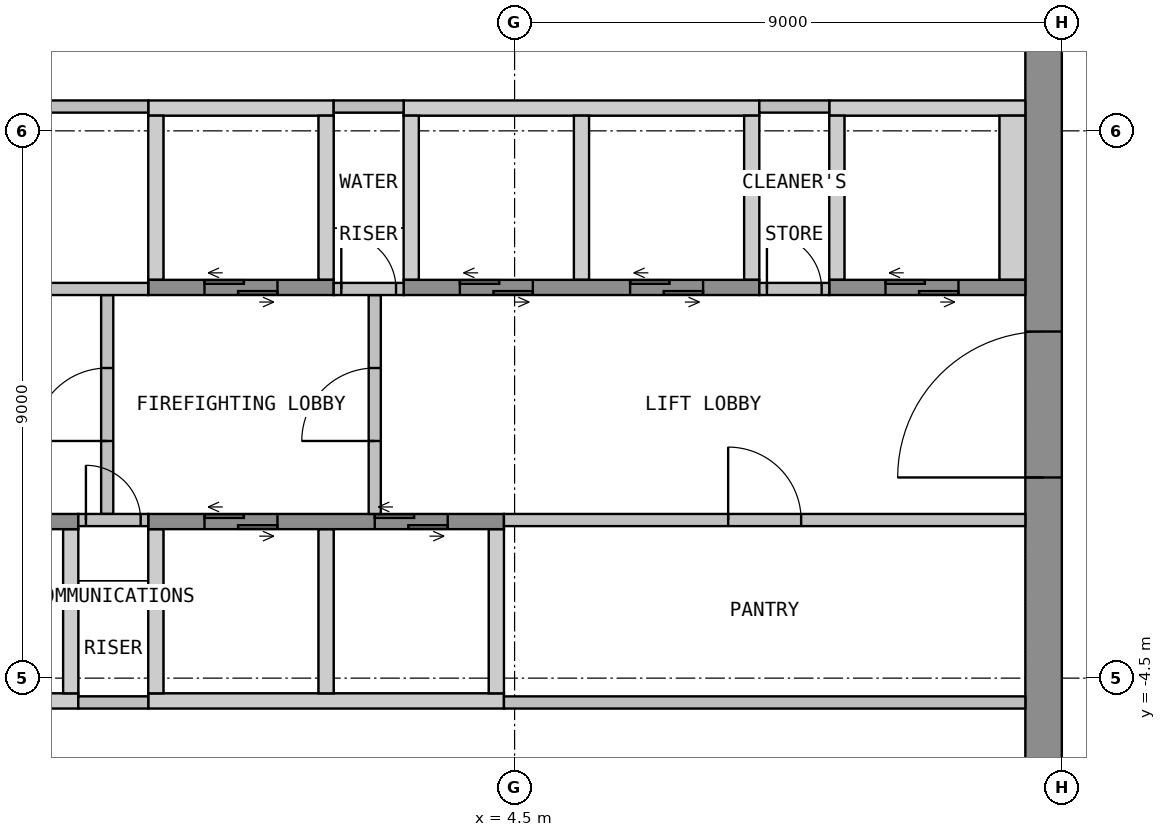
"""IFC4 building model, lengths in metres.
Left out: names, types, materials, properties, quantities, classifications, styles, units other than length and angle.
Written with IfcOpenShell. Run it as: python <this file> out.ifc"""

import sys

from ifc_helpers import new_model, si_unit, direction, frame, frame_2d, origin, place, context, subcontext, project, spatial, polyline, rectangle, outline, extrude, element, fill, save


model = new_model("IFC4")
c1 = context("Model", 3, precision=1e-05, world=origin(), true_north=direction((0.0, 1.0)))
c2 = subcontext(c1, "Body", "Model", "MODEL_VIEW")
j1 = project(units=[si_unit("LENGTHUNIT", "METRE"), si_unit("PLANEANGLEUNIT", "RADIAN")], contexts=[c1])
p1 = place(None, origin())
s1 = spatial("IfcSite", under=j1, at=p1, CompositionType="ELEMENT")
p2 = place(p1, origin())
s2 = spatial("IfcBuilding", under=s1, at=p2, CompositionType="ELEMENT")
p3 = place(p2, frame((0.0, 0.0, 282.0)))
s3 = spatial("IfcBuildingStorey", under=s2, at=p3, CompositionType="ELEMENT", Elevation=282.0)
p4 = place(p3, frame((13.2, -10.65, 0.0), z_axis=(0.0, 0.0, 1.0), x_axis=(0.0, 1.0, 0.0)))
e1 = element("IfcWall", 1, at=p4, inside=s3, PredefinedType="SHEAR", context=c2, shape_type="SweptSolid", body=[
    extrude(rectangle(XDim=21.3, YDim=0.6, at=frame_2d((10.65, 0.0))), origin(), (0.0, 0.0, 1.0), 4.175),
])
p5 = place(p4, frame((9.45, 0.0, 0.0)))
e2 = element("IfcOpeningElement", 2, at=p5, cuts=e1, PredefinedType="OPENING", context=c2, shape_type="SweptSolid", body=[
    extrude(rectangle(XDim=2.4, YDim=2.1, at=frame_2d((1.2, 1.05))), frame((0.0, 0.31, 0.0), z_axis=(0.0, -1.0, 0.0), x_axis=(1.0, 0.0, 0.0)), (0.0, 0.0, 1.0), 0.62),
])
p6 = place(p3, origin())
e3 = element("IfcWall", 3, at=p6, inside=s3, PredefinedType="SHEAR", context=c2, shape_type="SweptSolid", body=[
    extrude(outline(polyline([(-1.525, 4.75), (1.525, 4.75), (1.525, 5.0), (-1.525, 5.0), (-1.525, 4.75)])), origin(), (0.0, 0.0, 1.0), 4.175),
])
p7 = place(p3, origin())
e4 = element("IfcWall", 4, at=p7, inside=s3, PredefinedType="SHEAR", context=c2, shape_type="SweptSolid", body=[
    extrude(outline(polyline([(2.675, 4.75), (8.525, 4.75), (8.525, 5.0), (2.675, 5.0), (2.675, 4.75)])), origin(), (0.0, 0.0, 1.0), 4.175),
])
p8 = place(p3, origin())
e5 = element("IfcWall", 5, at=p8, inside=s3, PredefinedType="SHEAR", context=c2, shape_type="SweptSolid", body=[
    extrude(outline(polyline([(9.675, 4.75), (12.9, 4.75), (12.9, 5.0), (9.675, 5.0), (9.675, 4.75)])), origin(), (0.0, 0.0, 1.0), 4.175),
])
p9 = place(p3, origin())
e6 = element("IfcWall", 6, at=p9, inside=s3, PredefinedType="SHEAR", context=c2, shape_type="SweptSolid", body=[
    extrude(outline(polyline([(-1.525, 2.05), (-1.275, 2.05), (-1.275, 4.75), (-1.525, 4.75), (-1.525, 2.05)])), origin(), (0.0, 0.0, 1.0), 4.175),
])
p10 = place(p3, origin())
e7 = element("IfcWall", 7, at=p10, inside=s3, PredefinedType="SHEAR", context=c2, shape_type="SweptSolid", body=[
    extrude(outline(polyline([(1.275, 2.05), (1.525, 2.05), (1.525, 4.75), (1.275, 4.75), (1.275, 2.05)])), origin(), (0.0, 0.0, 1.0), 4.175),
])
p11 = place(p3, origin())
e8 = element("IfcWall", 8, at=p11, inside=s3, PredefinedType="SHEAR", context=c2, shape_type="SweptSolid", body=[
    extrude(outline(polyline([(2.675, 2.05), (2.925, 2.05), (2.925, 4.75), (2.675, 4.75), (2.675, 2.05)])), origin(), (0.0, 0.0, 1.0), 4.175),
])
p12 = place(p3, origin())
e9 = element("IfcWall", 9, at=p12, inside=s3, PredefinedType="SHEAR", context=c2, shape_type="SweptSolid", body=[
    extrude(outline(polyline([(5.475, 2.05), (5.725, 2.05), (5.725, 4.75), (5.475, 4.75), (5.475, 2.05)])), origin(), (0.0, 0.0, 1.0), 4.175),
])
p13 = place(p3, origin())
e10 = element("IfcWall", 10, at=p13, inside=s3, PredefinedType="SHEAR", context=c2, shape_type="SweptSolid", body=[
    extrude(outline(polyline([(8.275, 2.05), (8.525, 2.05), (8.525, 4.75), (8.275, 4.75), (8.275, 2.05)])), origin(), (0.0, 0.0, 1.0), 4.175),
])
p14 = place(p3, origin())
e11 = element("IfcWall", 11, at=p14, inside=s3, PredefinedType="SHEAR", context=c2, shape_type="SweptSolid", body=[
    extrude(outline(polyline([(9.675, 2.05), (9.925, 2.05), (9.925, 4.75), (9.675, 4.75), (9.675, 2.05)])), origin(), (0.0, 0.0, 1.0), 4.175),
])
p15 = place(p3, origin())
e12 = element("IfcWall", 12, at=p15, inside=s3, PredefinedType="SHEAR", context=c2, shape_type="SweptSolid", body=[
    extrude(outline(polyline([(12.475, 2.05), (12.9, 2.05), (12.9, 4.75), (12.475, 4.75), (12.475, 2.05)])), origin(), (0.0, 0.0, 1.0), 4.175),
])
p16 = place(p3, frame((-1.525, 1.925, 0.0), z_axis=(0.0, 0.0, 1.0), x_axis=(1.0, 0.0, 0.0)))
e13 = element("IfcWall", 13, at=p16, inside=s3, PredefinedType="SHEAR", context=c2, shape_type="SweptSolid", body=[
    extrude(rectangle(XDim=3.05, YDim=0.25, at=frame_2d((1.525, 0.0))), origin(), (0.0, 0.0, 1.0), 4.175),
])
p17 = place(p16, frame((0.925, 0.0, 0.0)))
e14 = element("IfcOpeningElement", 14, at=p17, cuts=e13, PredefinedType="OPENING", context=c2, shape_type="SweptSolid", body=[
    extrude(rectangle(XDim=1.2, YDim=2.1, at=frame_2d((0.6, 1.05))), frame((0.0, 0.135, 0.0), z_axis=(0.0, -1.0, 0.0), x_axis=(1.0, 0.0, 0.0)), (0.0, 0.0, 1.0), 0.27),
])
p18 = place(p3, frame((2.675, 1.925, 0.0), z_axis=(0.0, 0.0, 1.0), x_axis=(1.0, 0.0, 0.0)))
e15 = element("IfcWall", 15, at=p18, inside=s3, PredefinedType="SHEAR", context=c2, shape_type="SweptSolid", body=[
    extrude(rectangle(XDim=5.85, YDim=0.25, at=frame_2d((2.925, 0.0))), origin(), (0.0, 0.0, 1.0), 4.175),
])
p19 = place(p18, frame((0.925, 0.0, 0.0)))
e16 = element("IfcOpeningElement", 16, at=p19, cuts=e15, PredefinedType="OPENING", context=c2, shape_type="SweptSolid", body=[
    extrude(rectangle(XDim=1.2, YDim=2.1, at=frame_2d((0.6, 1.05))), frame((0.0, 0.135, 0.0), z_axis=(0.0, -1.0, 0.0), x_axis=(1.0, 0.0, 0.0)), (0.0, 0.0, 1.0), 0.27),
])
p20 = place(p18, frame((3.725, 0.0, 0.0)))
e17 = element("IfcOpeningElement", 17, at=p20, cuts=e15, PredefinedType="OPENING", context=c2, shape_type="SweptSolid", body=[
    extrude(rectangle(XDim=1.2, YDim=2.1, at=frame_2d((0.6, 1.05))), frame((0.0, 0.135, 0.0), z_axis=(0.0, -1.0, 0.0), x_axis=(1.0, 0.0, 0.0)), (0.0, 0.0, 1.0), 0.27),
])
p21 = place(p3, frame((9.675, 1.925, 0.0), z_axis=(0.0, 0.0, 1.0), x_axis=(1.0, 0.0, 0.0)))
e18 = element("IfcWall", 18, at=p21, inside=s3, PredefinedType="SHEAR", context=c2, shape_type="SweptSolid", body=[
    extrude(rectangle(XDim=3.225, YDim=0.25, at=frame_2d((1.612, 0.0))), origin(), (0.0, 0.0, 1.0), 4.175),
])
p22 = place(p21, frame((0.925, 0.0, 0.0)))
e19 = element("IfcOpeningElement", 19, at=p22, cuts=e18, PredefinedType="OPENING", context=c2, shape_type="SweptSolid", body=[
    extrude(rectangle(XDim=1.2, YDim=2.1, at=frame_2d((0.6, 1.05))), frame((0.0, 0.135, 0.0), z_axis=(0.0, -1.0, 0.0), x_axis=(1.0, 0.0, 0.0)), (0.0, 0.0, 1.0), 0.27),
])
p23 = place(p3, origin())
e20 = element("IfcWall", 20, at=p23, inside=s3, PredefinedType="SHEAR", context=c2, shape_type="SweptSolid", body=[
    extrude(outline(polyline([(-11.325, -5.0), (-2.675, -5.0), (-2.675, -4.75), (-11.325, -4.75), (-11.325, -5.0)])), origin(), (0.0, 0.0, 1.0), 4.175),
])
p24 = place(p3, origin())
e21 = element("IfcWall", 21, at=p24, inside=s3, PredefinedType="SHEAR", context=c2, shape_type="SweptSolid", body=[
    extrude(outline(polyline([(-1.525, -5.0), (4.325, -5.0), (4.325, -4.75), (-1.525, -4.75), (-1.525, -5.0)])), origin(), (0.0, 0.0, 1.0), 4.175),
])
p25 = place(p3, origin())
e22 = element("IfcWall", 22, at=p25, inside=s3, PredefinedType="SHEAR", context=c2, shape_type="SweptSolid", body=[
    extrude(outline(polyline([(-2.925, -4.75), (-2.675, -4.75), (-2.675, -2.05), (-2.925, -2.05), (-2.925, -4.75)])), origin(), (0.0, 0.0, 1.0), 4.175),
])
p26 = place(p3, origin())
e23 = element("IfcWall", 23, at=p26, inside=s3, PredefinedType="SHEAR", context=c2, shape_type="SweptSolid", body=[
    extrude(outline(polyline([(-1.525, -4.75), (-1.275, -4.75), (-1.275, -2.05), (-1.525, -2.05), (-1.525, -4.75)])), origin(), (0.0, 0.0, 1.0), 4.175),
])
p27 = place(p3, origin())
e24 = element("IfcWall", 24, at=p27, inside=s3, PredefinedType="SHEAR", context=c2, shape_type="SweptSolid", body=[
    extrude(outline(polyline([(1.275, -4.75), (1.525, -4.75), (1.525, -2.05), (1.275, -2.05), (1.275, -4.75)])), origin(), (0.0, 0.0, 1.0), 4.175),
])
p28 = place(p3, origin())
e25 = element("IfcWall", 25, at=p28, inside=s3, PredefinedType="SHEAR", context=c2, shape_type="SweptSolid", body=[
    extrude(outline(polyline([(4.075, -4.75), (4.325, -4.75), (4.325, -2.05), (4.075, -2.05), (4.075, -4.75)])), origin(), (0.0, 0.0, 1.0), 4.175),
])
p29 = place(p3, frame((-11.325, -1.925, 0.0), z_axis=(0.0, 0.0, 1.0), x_axis=(1.0, 0.0, 0.0)))
e26 = element("IfcWall", 26, at=p29, inside=s3, PredefinedType="SHEAR", context=c2, shape_type="SweptSolid", body=[
    extrude(rectangle(XDim=8.65, YDim=0.25, at=frame_2d((4.325, 0.0))), origin(), (0.0, 0.0, 1.0), 4.175),
])
p30 = place(p29, frame((0.925, 0.0, 0.0)))
e27 = element("IfcOpeningElement", 27, at=p30, cuts=e26, PredefinedType="OPENING", context=c2, shape_type="SweptSolid", body=[
    extrude(rectangle(XDim=1.2, YDim=2.1, at=frame_2d((0.6, 1.05))), frame((0.0, 0.135, 0.0), z_axis=(0.0, -1.0, 0.0), x_axis=(1.0, 0.0, 0.0)), (0.0, 0.0, 1.0), 0.27),
])
p31 = place(p29, frame((3.725, 0.0, 0.0)))
e28 = element("IfcOpeningElement", 28, at=p31, cuts=e26, PredefinedType="OPENING", context=c2, shape_type="SweptSolid", body=[
    extrude(rectangle(XDim=1.2, YDim=2.1, at=frame_2d((0.6, 1.05))), frame((0.0, 0.135, 0.0), z_axis=(0.0, -1.0, 0.0), x_axis=(1.0, 0.0, 0.0)), (0.0, 0.0, 1.0), 0.27),
])
p32 = place(p29, frame((6.525, 0.0, 0.0)))
e29 = element("IfcOpeningElement", 29, at=p32, cuts=e26, PredefinedType="OPENING", context=c2, shape_type="SweptSolid", body=[
    extrude(rectangle(XDim=1.2, YDim=2.1, at=frame_2d((0.6, 1.05))), frame((0.0, 0.135, 0.0), z_axis=(0.0, -1.0, 0.0), x_axis=(1.0, 0.0, 0.0)), (0.0, 0.0, 1.0), 0.27),
])
p33 = place(p3, frame((-1.525, -1.925, 0.0), z_axis=(0.0, 0.0, 1.0), x_axis=(1.0, 0.0, 0.0)))
e30 = element("IfcWall", 30, at=p33, inside=s3, PredefinedType="SHEAR", context=c2, shape_type="SweptSolid", body=[
    extrude(rectangle(XDim=5.85, YDim=0.25, at=frame_2d((2.925, 0.0))), origin(), (0.0, 0.0, 1.0), 4.175),
])
p34 = place(p33, frame((0.925, 0.0, 0.0)))
e31 = element("IfcOpeningElement", 31, at=p34, cuts=e30, PredefinedType="OPENING", context=c2, shape_type="SweptSolid", body=[
    extrude(rectangle(XDim=1.2, YDim=2.1, at=frame_2d((0.6, 1.05))), frame((0.0, 0.135, 0.0), z_axis=(0.0, -1.0, 0.0), x_axis=(1.0, 0.0, 0.0)), (0.0, 0.0, 1.0), 0.27),
])
p35 = place(p33, frame((3.725, 0.0, 0.0)))
e32 = element("IfcOpeningElement", 32, at=p35, cuts=e30, PredefinedType="OPENING", context=c2, shape_type="SweptSolid", body=[
    extrude(rectangle(XDim=1.2, YDim=2.1, at=frame_2d((0.6, 1.05))), frame((0.0, 0.135, 0.0), z_axis=(0.0, -1.0, 0.0), x_axis=(1.0, 0.0, 0.0)), (0.0, 0.0, 1.0), 0.27),
])
p36 = place(p3, frame((-2.2, -1.8, 0.0), z_axis=(0.0, 0.0, 1.0), x_axis=(0.0, 1.0, 0.0)))
e33 = element("IfcWall", 33, at=p36, inside=s3, PredefinedType="PARTITIONING", context=c2, shape_type="SweptSolid", body=[
    extrude(rectangle(XDim=3.6, YDim=0.2, at=frame_2d((1.8, 0.0))), origin(), (0.0, 0.0, 1.0), 4.175),
])
p37 = place(p36, frame((1.2, 0.0, 0.0)))
e34 = element("IfcOpeningElement", 34, at=p37, cuts=e33, PredefinedType="OPENING", context=c2, shape_type="SweptSolid", body=[
    extrude(rectangle(XDim=1.2, YDim=2.1, at=frame_2d((0.6, 1.05))), frame((0.0, 0.11, 0.0), z_axis=(0.0, -1.0, 0.0), x_axis=(1.0, 0.0, 0.0)), (0.0, 0.0, 1.0), 0.22),
])
p38 = place(p3, frame((2.2, -1.8, 0.0), z_axis=(0.0, 0.0, 1.0), x_axis=(0.0, 1.0, 0.0)))
e35 = element("IfcWall", 35, at=p38, inside=s3, PredefinedType="PARTITIONING", context=c2, shape_type="SweptSolid", body=[
    extrude(rectangle(XDim=3.6, YDim=0.2, at=frame_2d((1.8, 0.0))), origin(), (0.0, 0.0, 1.0), 4.175),
])
p39 = place(p38, frame((1.2, 0.0, 0.0)))
e36 = element("IfcOpeningElement", 36, at=p39, cuts=e35, PredefinedType="OPENING", context=c2, shape_type="SweptSolid", body=[
    extrude(rectangle(XDim=1.2, YDim=2.1, at=frame_2d((0.6, 1.05))), frame((0.0, 0.11, 0.0), z_axis=(0.0, -1.0, 0.0), x_axis=(1.0, 0.0, 0.0)), (0.0, 0.0, 1.0), 0.22),
])
p40 = place(p3, frame((-12.9, 1.9, 0.0), z_axis=(0.0, 0.0, 1.0), x_axis=(1.0, 0.0, 0.0)))
e37 = element("IfcWall", 37, at=p40, inside=s3, PredefinedType="PARTITIONING", context=c2, shape_type="SweptSolid", body=[
    extrude(rectangle(XDim=11.375, YDim=0.2, at=frame_2d((5.688, 0.0))), origin(), (0.0, 0.0, 1.0), 4.175),
])
p41 = place(p40, frame((5.087, 0.0, 0.0)))
e38 = element("IfcOpeningElement", 38, at=p41, cuts=e37, PredefinedType="OPENING", context=c2, shape_type="SweptSolid", body=[
    extrude(rectangle(XDim=1.2, YDim=2.1, at=frame_2d((0.6, 1.05))), frame((0.0, 0.11, 0.0), z_axis=(0.0, -1.0, 0.0), x_axis=(1.0, 0.0, 0.0)), (0.0, 0.0, 1.0), 0.22),
])
p42 = place(p3, frame((-12.9, 4.9, 0.0), z_axis=(0.0, 0.0, 1.0), x_axis=(1.0, 0.0, 0.0)))
e39 = element("IfcWall", 39, at=p42, inside=s3, PredefinedType="PARTITIONING", context=c2, shape_type="SweptSolid", body=[
    extrude(rectangle(XDim=11.375, YDim=0.2, at=frame_2d((5.688, 0.0))), origin(), (0.0, 0.0, 1.0), 4.175),
])
p43 = place(p3, frame((1.525, 1.9, 0.0), z_axis=(0.0, 0.0, 1.0), x_axis=(1.0, 0.0, 0.0)))
e40 = element("IfcWall", 40, at=p43, inside=s3, PredefinedType="PARTITIONING", context=c2, shape_type="SweptSolid", body=[
    extrude(rectangle(XDim=1.15, YDim=0.2, at=frame_2d((0.575, 0.0))), origin(), (0.0, 0.0, 1.0), 4.175),
])
p44 = place(p43, frame((0.125, 0.0, 0.0)))
e41 = element("IfcOpeningElement", 41, at=p44, cuts=e40, PredefinedType="OPENING", context=c2, shape_type="SweptSolid", body=[
    extrude(rectangle(XDim=0.9, YDim=2.1, at=frame_2d((0.45, 1.05))), frame((0.0, 0.11, 0.0), z_axis=(0.0, -1.0, 0.0), x_axis=(1.0, 0.0, 0.0)), (0.0, 0.0, 1.0), 0.22),
])
p45 = place(p3, frame((1.525, 4.9, 0.0), z_axis=(0.0, 0.0, 1.0), x_axis=(1.0, 0.0, 0.0)))
e42 = element("IfcWall", 42, at=p45, inside=s3, PredefinedType="PARTITIONING", context=c2, shape_type="SweptSolid", body=[
    extrude(rectangle(XDim=1.15, YDim=0.2, at=frame_2d((0.575, 0.0))), origin(), (0.0, 0.0, 1.0), 4.175),
])
p46 = place(p3, frame((8.525, 1.9, 0.0), z_axis=(0.0, 0.0, 1.0), x_axis=(1.0, 0.0, 0.0)))
e43 = element("IfcWall", 43, at=p46, inside=s3, PredefinedType="PARTITIONING", context=c2, shape_type="SweptSolid", body=[
    extrude(rectangle(XDim=1.15, YDim=0.2, at=frame_2d((0.575, 0.0))), origin(), (0.0, 0.0, 1.0), 4.175),
])
p47 = place(p46, frame((0.125, 0.0, 0.0)))
e44 = element("IfcOpeningElement", 44, at=p47, cuts=e43, PredefinedType="OPENING", context=c2, shape_type="SweptSolid", body=[
    extrude(rectangle(XDim=0.9, YDim=2.1, at=frame_2d((0.45, 1.05))), frame((0.0, 0.11, 0.0), z_axis=(0.0, -1.0, 0.0), x_axis=(1.0, 0.0, 0.0)), (0.0, 0.0, 1.0), 0.22),
])
p48 = place(p3, frame((8.525, 4.9, 0.0), z_axis=(0.0, 0.0, 1.0), x_axis=(1.0, 0.0, 0.0)))
e45 = element("IfcWall", 45, at=p48, inside=s3, PredefinedType="PARTITIONING", context=c2, shape_type="SweptSolid", body=[
    extrude(rectangle(XDim=1.15, YDim=0.2, at=frame_2d((0.575, 0.0))), origin(), (0.0, 0.0, 1.0), 4.175),
])
p49 = place(p3, frame((-2.675, -1.9, 0.0), z_axis=(0.0, 0.0, 1.0), x_axis=(1.0, 0.0, 0.0)))
e46 = element("IfcWall", 46, at=p49, inside=s3, PredefinedType="PARTITIONING", context=c2, shape_type="SweptSolid", body=[
    extrude(rectangle(XDim=1.15, YDim=0.2, at=frame_2d((0.575, 0.0))), origin(), (0.0, 0.0, 1.0), 4.175),
])
p50 = place(p49, frame((0.125, 0.0, 0.0)))
e47 = element("IfcOpeningElement", 47, at=p50, cuts=e46, PredefinedType="OPENING", context=c2, shape_type="SweptSolid", body=[
    extrude(rectangle(XDim=0.9, YDim=2.1, at=frame_2d((0.45, 1.05))), frame((0.0, 0.11, 0.0), z_axis=(0.0, -1.0, 0.0), x_axis=(1.0, 0.0, 0.0)), (0.0, 0.0, 1.0), 0.22),
])
p51 = place(p3, frame((-2.675, -4.9, 0.0), z_axis=(0.0, 0.0, 1.0), x_axis=(1.0, 0.0, 0.0)))
e48 = element("IfcWall", 48, at=p51, inside=s3, PredefinedType="PARTITIONING", context=c2, shape_type="SweptSolid", body=[
    extrude(rectangle(XDim=1.15, YDim=0.2, at=frame_2d((0.575, 0.0))), origin(), (0.0, 0.0, 1.0), 4.175),
])
p52 = place(p3, frame((4.325, -1.9, 0.0), z_axis=(0.0, 0.0, 1.0), x_axis=(1.0, 0.0, 0.0)))
e49 = element("IfcWall", 49, at=p52, inside=s3, PredefinedType="PARTITIONING", context=c2, shape_type="SweptSolid", body=[
    extrude(rectangle(XDim=8.575, YDim=0.2, at=frame_2d((4.288, 0.0))), origin(), (0.0, 0.0, 1.0), 4.175),
])
p53 = place(p52, frame((3.688, 0.0, 0.0)))
e50 = element("IfcOpeningElement", 50, at=p53, cuts=e49, PredefinedType="OPENING", context=c2, shape_type="SweptSolid", body=[
    extrude(rectangle(XDim=1.2, YDim=2.1, at=frame_2d((0.6, 1.05))), frame((0.0, 0.11, 0.0), z_axis=(0.0, -1.0, 0.0), x_axis=(1.0, 0.0, 0.0)), (0.0, 0.0, 1.0), 0.22),
])
p54 = place(p3, frame((4.325, -4.9, 0.0), z_axis=(0.0, 0.0, 1.0), x_axis=(1.0, 0.0, 0.0)))
e51 = element("IfcWall", 51, at=p54, inside=s3, PredefinedType="PARTITIONING", context=c2, shape_type="SweptSolid", body=[
    extrude(rectangle(XDim=8.575, YDim=0.2, at=frame_2d((4.288, 0.0))), origin(), (0.0, 0.0, 1.0), 4.175),
])
p55 = place(p5, origin())
e52 = element("IfcDoor", 52, at=p55, inside=s3, OperationType="DOUBLE_DOOR_DOUBLE_SWING", PredefinedType="DOOR", context=c2, shape_type="SweptSolid", body=[
    extrude(rectangle(XDim=2.4, YDim=2.1, at=frame_2d((1.2, 1.05))), frame((0.0, 0.025, 0.0), z_axis=(0.0, -1.0, 0.0), x_axis=(1.0, 0.0, 0.0)), (0.0, 0.0, 1.0), 0.05),
])
fill(e2, e52)
p56 = place(p17, origin())
e53 = element("IfcDoor", 53, at=p56, inside=s3, OperationType="DOUBLE_DOOR_SLIDING", PredefinedType="DOOR", context=c2, shape_type="SweptSolid", body=[
    extrude(rectangle(XDim=1.2, YDim=2.1, at=frame_2d((0.6, 1.05))), frame((0.0, 0.025, 0.0), z_axis=(0.0, -1.0, 0.0), x_axis=(1.0, 0.0, 0.0)), (0.0, 0.0, 1.0), 0.05),
])
fill(e14, e53)
p57 = place(p19, origin())
e54 = element("IfcDoor", 54, at=p57, inside=s3, OperationType="DOUBLE_DOOR_SLIDING", PredefinedType="DOOR", context=c2, shape_type="SweptSolid", body=[
    extrude(rectangle(XDim=1.2, YDim=2.1, at=frame_2d((0.6, 1.05))), frame((0.0, 0.025, 0.0), z_axis=(0.0, -1.0, 0.0), x_axis=(1.0, 0.0, 0.0)), (0.0, 0.0, 1.0), 0.05),
])
fill(e16, e54)
p58 = place(p20, origin())
e55 = element("IfcDoor", 55, at=p58, inside=s3, OperationType="DOUBLE_DOOR_SLIDING", PredefinedType="DOOR", context=c2, shape_type="SweptSolid", body=[
    extrude(rectangle(XDim=1.2, YDim=2.1, at=frame_2d((0.6, 1.05))), frame((0.0, 0.025, 0.0), z_axis=(0.0, -1.0, 0.0), x_axis=(1.0, 0.0, 0.0)), (0.0, 0.0, 1.0), 0.05),
])
fill(e17, e55)
p59 = place(p22, origin())
e56 = element("IfcDoor", 56, at=p59, inside=s3, OperationType="DOUBLE_DOOR_SLIDING", PredefinedType="DOOR", context=c2, shape_type="SweptSolid", body=[
    extrude(rectangle(XDim=1.2, YDim=2.1, at=frame_2d((0.6, 1.05))), frame((0.0, 0.025, 0.0), z_axis=(0.0, -1.0, 0.0), x_axis=(1.0, 0.0, 0.0)), (0.0, 0.0, 1.0), 0.05),
])
fill(e19, e56)
p60 = place(p34, origin())
e57 = element("IfcDoor", 57, at=p60, inside=s3, OperationType="DOUBLE_DOOR_SLIDING", PredefinedType="DOOR", context=c2, shape_type="SweptSolid", body=[
    extrude(rectangle(XDim=1.2, YDim=2.1, at=frame_2d((0.6, 1.05))), frame((0.0, 0.025, 0.0), z_axis=(0.0, -1.0, 0.0), x_axis=(1.0, 0.0, 0.0)), (0.0, 0.0, 1.0), 0.05),
])
fill(e31, e57)
p61 = place(p35, origin())
e58 = element("IfcDoor", 58, at=p61, inside=s3, OperationType="DOUBLE_DOOR_SLIDING", PredefinedType="DOOR", context=c2, shape_type="SweptSolid", body=[
    extrude(rectangle(XDim=1.2, YDim=2.1, at=frame_2d((0.6, 1.05))), frame((0.0, 0.025, 0.0), z_axis=(0.0, -1.0, 0.0), x_axis=(1.0, 0.0, 0.0)), (0.0, 0.0, 1.0), 0.05),
])
fill(e32, e58)
p62 = place(p37, origin())
e59 = element("IfcDoor", 59, at=p62, inside=s3, OperationType="SINGLE_SWING_LEFT", PredefinedType="DOOR", context=c2, shape_type="SweptSolid", body=[
    extrude(rectangle(XDim=1.2, YDim=2.1, at=frame_2d((0.6, 1.05))), frame((0.0, 0.025, 0.0), z_axis=(0.0, -1.0, 0.0), x_axis=(1.0, 0.0, 0.0)), (0.0, 0.0, 1.0), 0.05),
])
fill(e34, e59)
p63 = place(p39, origin())
e60 = element("IfcDoor", 60, at=p63, inside=s3, OperationType="SINGLE_SWING_LEFT", PredefinedType="DOOR", context=c2, shape_type="SweptSolid", body=[
    extrude(rectangle(XDim=1.2, YDim=2.1, at=frame_2d((0.6, 1.05))), frame((0.0, 0.025, 0.0), z_axis=(0.0, -1.0, 0.0), x_axis=(1.0, 0.0, 0.0)), (0.0, 0.0, 1.0), 0.05),
])
fill(e36, e60)
p64 = place(p44, origin())
e61 = element("IfcDoor", 61, at=p64, inside=s3, OperationType="SINGLE_SWING_LEFT", PredefinedType="DOOR", context=c2, shape_type="SweptSolid", body=[
    extrude(rectangle(XDim=0.9, YDim=2.1, at=frame_2d((0.45, 1.05))), frame((0.0, 0.025, 0.0), z_axis=(0.0, -1.0, 0.0), x_axis=(1.0, 0.0, 0.0)), (0.0, 0.0, 1.0), 0.05),
])
fill(e41, e61)
p65 = place(p47, origin())
e62 = element("IfcDoor", 62, at=p65, inside=s3, OperationType="SINGLE_SWING_LEFT", PredefinedType="DOOR", context=c2, shape_type="SweptSolid", body=[
    extrude(rectangle(XDim=0.9, YDim=2.1, at=frame_2d((0.45, 1.05))), frame((0.0, 0.025, 0.0), z_axis=(0.0, -1.0, 0.0), x_axis=(1.0, 0.0, 0.0)), (0.0, 0.0, 1.0), 0.05),
])
fill(e44, e62)
p66 = place(p50, origin())
e63 = element("IfcDoor", 63, at=p66, inside=s3, OperationType="SINGLE_SWING_LEFT", PredefinedType="DOOR", context=c2, shape_type="SweptSolid", body=[
    extrude(rectangle(XDim=0.9, YDim=2.1, at=frame_2d((0.45, 1.05))), frame((0.0, 0.025, 0.0), z_axis=(0.0, -1.0, 0.0), x_axis=(1.0, 0.0, 0.0)), (0.0, 0.0, 1.0), 0.05),
])
fill(e47, e63)
p67 = place(p53, origin())
e64 = element("IfcDoor", 64, at=p67, inside=s3, OperationType="SINGLE_SWING_RIGHT", PredefinedType="DOOR", context=c2, shape_type="SweptSolid", body=[
    extrude(rectangle(XDim=1.2, YDim=2.1, at=frame_2d((0.6, 1.05))), frame((0.0, 0.025, 0.0), z_axis=(0.0, -1.0, 0.0), x_axis=(1.0, 0.0, 0.0)), (0.0, 0.0, 1.0), 0.05),
])
fill(e50, e64)
save(model, sys.argv[1])
